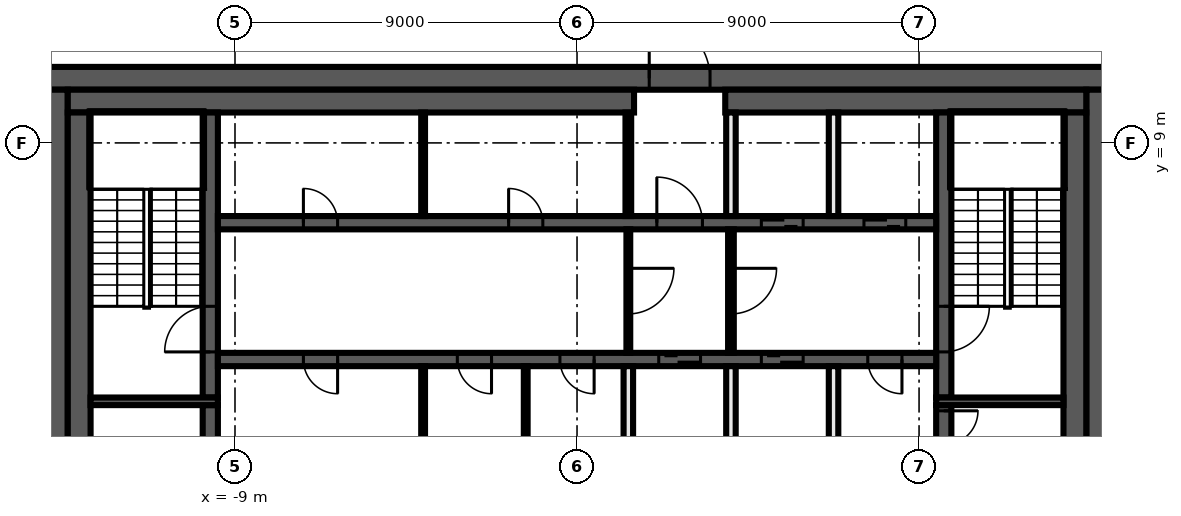
"""IFC4 building model, lengths in metres.
Left out: names, types, materials, properties, quantities, classifications, styles, units other than length and angle.
Written with IfcOpenShell. Run it as: python <this file> out.ifc"""

import sys

from ifc_helpers import new_model, si_unit, direction, frame, frame_2d, origin, place, context, subcontext, project, spatial, rectangle, extrude, element, fill, save


model = new_model("IFC4")
c1 = context("Model", 3, precision=1e-05, world=origin(), true_north=direction((0.0, 1.0)))
c2 = subcontext(c1, "Body", "Model", "MODEL_VIEW")
j1 = project(units=[si_unit("LENGTHUNIT", "METRE"), si_unit("PLANEANGLEUNIT", "RADIAN")], contexts=[c1])
p1 = place(None, origin())
s1 = spatial("IfcSite", under=j1, at=p1, CompositionType="ELEMENT")
p2 = place(p1, origin())
s2 = spatial("IfcBuilding", under=s1, at=p2, CompositionType="ELEMENT")
p3 = place(p2, frame((0.0, 0.0, 302.6)))
s3 = spatial("IfcBuildingStorey", under=s2, at=p3, CompositionType="ELEMENT", Elevation=302.6)
p4 = place(p3, frame((-14.0, 10.7, 0.0), z_axis=(0.0, 0.0, 1.0), x_axis=(1.0, 0.0, 0.0)))
e1 = element("IfcWall", 1, at=p4, inside=s3, PredefinedType="SHEAR", context=c2, shape_type="SweptSolid", body=[
    extrude(rectangle(XDim=28.0, YDim=0.6, at=frame_2d((14.0, 0.0))), origin(), (0.0, 0.0, 1.0), 3.82),
])
p5 = place(p4, frame((15.9, 0.0, 0.0)))
e2 = element("IfcOpeningElement", 2, at=p5, cuts=e1, PredefinedType="OPENING", context=c2, shape_type="SweptSolid", body=[
    extrude(rectangle(XDim=1.6, YDim=2.1, at=frame_2d((0.8, 1.05))), frame((0.0, 0.31, 0.0), z_axis=(0.0, -1.0, 0.0), x_axis=(1.0, 0.0, 0.0)), (0.0, 0.0, 1.0), 0.62),
])
for number, where, z_axis, x_axis in (
    (3, (13.7, 10.4, 0.0), (0.0, 0.0, 1.0), (0.0, -1.0, 0.0)),
    (4, (-13.7, -10.4, 0.0), (0.0, 0.0, 1.0), (0.0, 1.0, 0.0)),
):
    element("IfcWall", number, at=place(p3, frame(where, z_axis=z_axis, x_axis=x_axis)), inside=s3, PredefinedType="SHEAR", context=c2, shape_type="SweptSolid", body=[
        extrude(rectangle(XDim=20.8, YDim=0.6, at=frame_2d((10.4, 0.0))), origin(), (0.0, 0.0, 1.0), 3.82),
    ])
p6 = place(p3, frame((-13.4, 10.1, 0.0), z_axis=(0.0, 0.0, 1.0), x_axis=(1.0, 0.0, 0.0)))
e5 = element("IfcWall", 5, at=p6, inside=s3, PredefinedType="SHEAR", context=c2, shape_type="SweptSolid", body=[
    extrude(rectangle(XDim=14.9, YDim=0.6, at=frame_2d((7.45, 0.0))), origin(), (0.0, 0.0, 1.0), 3.82),
])
p7 = place(p3, frame((3.9, 10.1, 0.0), z_axis=(0.0, 0.0, 1.0), x_axis=(1.0, 0.0, 0.0)))
e6 = element("IfcWall", 6, at=p7, inside=s3, PredefinedType="SHEAR", context=c2, shape_type="SweptSolid", body=[
    extrude(rectangle(XDim=9.5, YDim=0.6, at=frame_2d((4.75, 0.0))), origin(), (0.0, 0.0, 1.0), 3.82),
])
for number, where, z_axis, x_axis in (
    (7, (13.1, 9.8, 0.0), (0.0, 0.0, 1.0), (0.0, -1.0, 0.0)),
    (8, (-13.1, -9.8, 0.0), (0.0, 0.0, 1.0), (0.0, 1.0, 0.0)),
):
    element("IfcWall", number, at=place(p3, frame(where, z_axis=z_axis, x_axis=x_axis)), inside=s3, PredefinedType="SHEAR", context=c2, shape_type="SweptSolid", body=[
        extrude(rectangle(XDim=19.6, YDim=0.6, at=frame_2d((9.8, 0.0))), origin(), (0.0, 0.0, 1.0), 3.82),
    ])
p8 = place(p3, frame((9.65, 2.1, 0.0), z_axis=(0.0, 0.0, 1.0), x_axis=(0.0, -1.0, 0.0)))
e9 = element("IfcWall", 9, at=p8, inside=s3, PredefinedType="SHEAR", context=c2, shape_type="SweptSolid", body=[
    extrude(rectangle(XDim=4.2, YDim=0.4, at=frame_2d((2.1, 0.0))), origin(), (0.0, 0.0, 1.0), 3.82),
])
p9 = place(p8, frame((0.15, 0.0, 0.0)))
e10 = element("IfcOpeningElement", 10, at=p9, cuts=e9, PredefinedType="OPENING", context=c2, shape_type="SweptSolid", body=[
    extrude(rectangle(XDim=0.9, YDim=2.1, at=frame_2d((0.45, 1.05))), frame((0.0, 0.21, 0.0), z_axis=(0.0, -1.0, 0.0), x_axis=(1.0, 0.0, 0.0)), (0.0, 0.0, 1.0), 0.42),
])
p10 = place(p3, frame((9.65, 9.8, 0.0), z_axis=(0.0, 0.0, 1.0), x_axis=(0.0, -1.0, 0.0)))
e11 = element("IfcWall", 11, at=p10, inside=s3, PredefinedType="SHEAR", context=c2, shape_type="SweptSolid", body=[
    extrude(rectangle(XDim=7.5, YDim=0.4, at=frame_2d((3.75, 0.0))), origin(), (0.0, 0.0, 1.0), 3.82),
])
p11 = place(p10, frame((5.1, 0.0, 0.0)))
e12 = element("IfcOpeningElement", 12, at=p11, cuts=e11, PredefinedType="OPENING", context=c2, shape_type="SweptSolid", body=[
    extrude(rectangle(XDim=1.2, YDim=2.1, at=frame_2d((0.6, 1.05))), frame((0.0, 0.21, 0.0), z_axis=(0.0, -1.0, 0.0), x_axis=(1.0, 0.0, 0.0)), (0.0, 0.0, 1.0), 0.42),
])
p12 = place(p3, frame((-9.65, -2.1, 0.0), z_axis=(0.0, 0.0, 1.0), x_axis=(0.0, 1.0, 0.0)))
e13 = element("IfcWall", 13, at=p12, inside=s3, PredefinedType="SHEAR", context=c2, shape_type="SweptSolid", body=[
    extrude(rectangle(XDim=4.2, YDim=0.4, at=frame_2d((2.1, 0.0))), origin(), (0.0, 0.0, 1.0), 3.82),
])
p13 = place(p3, frame((-9.65, 2.3, 0.0), z_axis=(0.0, 0.0, 1.0), x_axis=(0.0, 1.0, 0.0)))
e14 = element("IfcWall", 14, at=p13, inside=s3, PredefinedType="SHEAR", context=c2, shape_type="SweptSolid", body=[
    extrude(rectangle(XDim=7.5, YDim=0.4, at=frame_2d((3.75, 0.0))), origin(), (0.0, 0.0, 1.0), 3.82),
])
p14 = place(p13, frame((1.2, 0.0, 0.0)))
e15 = element("IfcOpeningElement", 15, at=p14, cuts=e14, PredefinedType="OPENING", context=c2, shape_type="SweptSolid", body=[
    extrude(rectangle(XDim=1.2, YDim=2.1, at=frame_2d((0.6, 1.05))), frame((0.0, 0.21, 0.0), z_axis=(0.0, -1.0, 0.0), x_axis=(1.0, 0.0, 0.0)), (0.0, 0.0, 1.0), 0.42),
])
for number, where, z_axis, x_axis in (
    (16, (9.45, 2.2, 0.0), (0.0, 0.0, 1.0), (1.0, 0.0, 0.0)),
    (17, (-9.45, 2.2, 0.0), (0.0, 0.0, 1.0), (-1.0, 0.0, 0.0)),
):
    element("IfcWall", number, at=place(p3, frame(where, z_axis=z_axis, x_axis=x_axis)), inside=s3, PredefinedType="SHEAR", context=c2, shape_type="SweptSolid", body=[
        extrude(rectangle(XDim=3.35, YDim=0.2, at=frame_2d((1.675, 0.0))), origin(), (0.0, 0.0, 1.0), 3.82),
    ])
p15 = place(p3, frame((-9.45, 6.9, 0.0), z_axis=(0.0, 0.0, 1.0), x_axis=(1.0, 0.0, 0.0)))
e18 = element("IfcWall", 18, at=p15, inside=s3, PredefinedType="SHEAR", context=c2, shape_type="SweptSolid", body=[
    extrude(rectangle(XDim=18.9, YDim=0.35, at=frame_2d((9.45, 0.0))), origin(), (0.0, 0.0, 1.0), 3.82),
])
p16 = place(p15, frame((11.55, 0.0, 0.0)))
e19 = element("IfcOpeningElement", 19, at=p16, cuts=e18, PredefinedType="OPENING", context=c2, shape_type="SweptSolid", body=[
    extrude(rectangle(XDim=1.2, YDim=2.1, at=frame_2d((0.6, 1.05))), frame((0.0, 0.185, 0.0), z_axis=(0.0, -1.0, 0.0), x_axis=(1.0, 0.0, 0.0)), (0.0, 0.0, 1.0), 0.37),
])
p17 = place(p15, frame((14.3, 0.0, 0.0)))
e20 = element("IfcOpeningElement", 20, at=p17, cuts=e18, PredefinedType="OPENING", context=c2, shape_type="SweptSolid", body=[
    extrude(rectangle(XDim=1.1, YDim=2.1, at=frame_2d((0.55, 1.05))), frame((0.0, 0.185, 0.0), z_axis=(0.0, -1.0, 0.0), x_axis=(1.0, 0.0, 0.0)), (0.0, 0.0, 1.0), 0.37),
])
p18 = place(p15, frame((17.0, 0.0, 0.0)))
e21 = element("IfcOpeningElement", 21, at=p18, cuts=e18, PredefinedType="OPENING", context=c2, shape_type="SweptSolid", body=[
    extrude(rectangle(XDim=1.1, YDim=2.1, at=frame_2d((0.55, 1.05))), frame((0.0, 0.185, 0.0), z_axis=(0.0, -1.0, 0.0), x_axis=(1.0, 0.0, 0.0)), (0.0, 0.0, 1.0), 0.37),
])
p19 = place(p15, frame((2.25, 0.0, 0.0)))
e22 = element("IfcOpeningElement", 22, at=p19, cuts=e18, PredefinedType="OPENING", context=c2, shape_type="SweptSolid", body=[
    extrude(rectangle(XDim=0.9, YDim=2.1, at=frame_2d((0.45, 1.05))), frame((0.0, 0.185, 0.0), z_axis=(0.0, -1.0, 0.0), x_axis=(1.0, 0.0, 0.0)), (0.0, 0.0, 1.0), 0.37),
])
p20 = place(p15, frame((7.65, 0.0, 0.0)))
e23 = element("IfcOpeningElement", 23, at=p20, cuts=e18, PredefinedType="OPENING", context=c2, shape_type="SweptSolid", body=[
    extrude(rectangle(XDim=0.9, YDim=2.1, at=frame_2d((0.45, 1.05))), frame((0.0, 0.185, 0.0), z_axis=(0.0, -1.0, 0.0), x_axis=(1.0, 0.0, 0.0)), (0.0, 0.0, 1.0), 0.37),
])
p21 = place(p3, frame((9.45, 3.3, 0.0), z_axis=(0.0, 0.0, 1.0), x_axis=(-1.0, 0.0, 0.0)))
e24 = element("IfcWall", 24, at=p21, inside=s3, PredefinedType="SHEAR", context=c2, shape_type="SweptSolid", body=[
    extrude(rectangle(XDim=18.9, YDim=0.35, at=frame_2d((9.45, 0.0))), origin(), (0.0, 0.0, 1.0), 3.82),
])
p22 = place(p21, frame((6.2, 0.0, 0.0)))
e25 = element("IfcOpeningElement", 25, at=p22, cuts=e24, PredefinedType="OPENING", context=c2, shape_type="SweptSolid", body=[
    extrude(rectangle(XDim=1.1, YDim=2.1, at=frame_2d((0.55, 1.05))), frame((0.0, 0.185, 0.0), z_axis=(0.0, -1.0, 0.0), x_axis=(1.0, 0.0, 0.0)), (0.0, 0.0, 1.0), 0.37),
])
p23 = place(p21, frame((3.5, 0.0, 0.0)))
e26 = element("IfcOpeningElement", 26, at=p23, cuts=e24, PredefinedType="OPENING", context=c2, shape_type="SweptSolid", body=[
    extrude(rectangle(XDim=1.1, YDim=2.1, at=frame_2d((0.55, 1.05))), frame((0.0, 0.185, 0.0), z_axis=(0.0, -1.0, 0.0), x_axis=(1.0, 0.0, 0.0)), (0.0, 0.0, 1.0), 0.37),
])
p24 = place(p21, frame((0.9, 0.0, 0.0)))
e27 = element("IfcOpeningElement", 27, at=p24, cuts=e24, PredefinedType="OPENING", context=c2, shape_type="SweptSolid", body=[
    extrude(rectangle(XDim=0.9, YDim=2.1, at=frame_2d((0.45, 1.05))), frame((0.0, 0.185, 0.0), z_axis=(0.0, -1.0, 0.0), x_axis=(1.0, 0.0, 0.0)), (0.0, 0.0, 1.0), 0.37),
])
p25 = place(p21, frame((15.75, 0.0, 0.0)))
e28 = element("IfcOpeningElement", 28, at=p25, cuts=e24, PredefinedType="OPENING", context=c2, shape_type="SweptSolid", body=[
    extrude(rectangle(XDim=0.9, YDim=2.1, at=frame_2d((0.45, 1.05))), frame((0.0, 0.185, 0.0), z_axis=(0.0, -1.0, 0.0), x_axis=(1.0, 0.0, 0.0)), (0.0, 0.0, 1.0), 0.37),
])
p26 = place(p21, frame((11.7, 0.0, 0.0)))
e29 = element("IfcOpeningElement", 29, at=p26, cuts=e24, PredefinedType="OPENING", context=c2, shape_type="SweptSolid", body=[
    extrude(rectangle(XDim=0.9, YDim=2.1, at=frame_2d((0.45, 1.05))), frame((0.0, 0.185, 0.0), z_axis=(0.0, -1.0, 0.0), x_axis=(1.0, 0.0, 0.0)), (0.0, 0.0, 1.0), 0.37),
])
p27 = place(p21, frame((9.0, 0.0, 0.0)))
e30 = element("IfcOpeningElement", 30, at=p27, cuts=e24, PredefinedType="OPENING", context=c2, shape_type="SweptSolid", body=[
    extrude(rectangle(XDim=0.9, YDim=2.1, at=frame_2d((0.45, 1.05))), frame((0.0, 0.185, 0.0), z_axis=(0.0, -1.0, 0.0), x_axis=(1.0, 0.0, 0.0)), (0.0, 0.0, 1.0), 0.37),
])
for number, where, z_axis, x_axis in (
    (31, (6.75, 0.4, 0.0), (0.0, 0.0, 1.0), (0.0, 1.0, 0.0)),
    (32, (6.75, 7.075, 0.0), (0.0, 0.0, 1.0), (0.0, 1.0, 0.0)),
):
    element("IfcWall", number, at=place(p3, frame(where, z_axis=z_axis, x_axis=x_axis)), inside=s3, PredefinedType="SOLIDWALL", context=c2, shape_type="SweptSolid", body=[
        extrude(rectangle(XDim=2.725, YDim=0.25, at=frame_2d((1.363, 0.0))), origin(), (0.0, 0.0, 1.0), 3.82),
    ])
p28 = place(p3, frame((4.05, 6.725, 0.0), z_axis=(0.0, 0.0, 1.0), x_axis=(0.0, -1.0, 0.0)))
e33 = element("IfcWall", 33, at=p28, inside=s3, PredefinedType="PARTITIONING", context=c2, shape_type="SweptSolid", body=[
    extrude(rectangle(XDim=3.25, YDim=0.15, at=frame_2d((1.625, 0.0))), origin(), (0.0, 0.0, 1.0), 3.82),
])
p29 = place(p28, frame((1.025, 0.0, 0.0)))
e34 = element("IfcOpeningElement", 34, at=p29, cuts=e33, PredefinedType="OPENING", context=c2, shape_type="SweptSolid", body=[
    extrude(rectangle(XDim=1.2, YDim=2.1, at=frame_2d((0.6, 1.05))), frame((0.0, 0.085, 0.0), z_axis=(0.0, -1.0, 0.0), x_axis=(1.0, 0.0, 0.0)), (0.0, 0.0, 1.0), 0.17),
])
for number, where, z_axis, x_axis in (
    (35, (4.05, 0.4, 0.0), (0.0, 0.0, 1.0), (0.0, 1.0, 0.0)),
    (36, (4.05, 7.075, 0.0), (0.0, 0.0, 1.0), (0.0, 1.0, 0.0)),
):
    element("IfcWall", number, at=place(p3, frame(where, z_axis=z_axis, x_axis=x_axis)), inside=s3, PredefinedType="SOLIDWALL", context=c2, shape_type="SweptSolid", body=[
        extrude(rectangle(XDim=2.725, YDim=0.25, at=frame_2d((1.363, 0.0))), origin(), (0.0, 0.0, 1.0), 3.82),
    ])
p30 = place(p3, frame((1.35, 7.075, 0.0), z_axis=(0.0, 0.0, 1.0), x_axis=(0.0, 1.0, 0.0)))
e37 = element("IfcWall", 37, at=p30, inside=s3, PredefinedType="PARTITIONING", context=c2, shape_type="SweptSolid", body=[
    extrude(rectangle(XDim=2.725, YDim=0.15, at=frame_2d((1.363, 0.0))), origin(), (0.0, 0.0, 1.0), 3.82),
])
p31 = place(p3, frame((1.35, 6.725, 0.0), z_axis=(0.0, 0.0, 1.0), x_axis=(0.0, -1.0, 0.0)))
e38 = element("IfcWall", 38, at=p31, inside=s3, PredefinedType="PARTITIONING", context=c2, shape_type="SweptSolid", body=[
    extrude(rectangle(XDim=3.25, YDim=0.1, at=frame_2d((1.625, 0.0))), origin(), (0.0, 0.0, 1.0), 3.82),
])
p32 = place(p31, frame((1.025, 0.0, 0.0)))
e39 = element("IfcOpeningElement", 39, at=p32, cuts=e38, PredefinedType="OPENING", context=c2, shape_type="SweptSolid", body=[
    extrude(rectangle(XDim=1.2, YDim=2.1, at=frame_2d((0.6, 1.05))), frame((0.0, 0.06, 0.0), z_axis=(0.0, -1.0, 0.0), x_axis=(1.0, 0.0, 0.0)), (0.0, 0.0, 1.0), 0.12),
])
p33 = place(p3, frame((1.35, 0.4, 0.0), z_axis=(0.0, 0.0, 1.0), x_axis=(0.0, 1.0, 0.0)))
e40 = element("IfcWall", 40, at=p33, inside=s3, PredefinedType="SOLIDWALL", context=c2, shape_type="SweptSolid", body=[
    extrude(rectangle(XDim=2.725, YDim=0.25, at=frame_2d((1.363, 0.0))), origin(), (0.0, 0.0, 1.0), 3.82),
])
for number, where, z_axis, x_axis in (
    (41, (-1.35, 0.4, 0.0), (0.0, 0.0, 1.0), (0.0, 1.0, 0.0)),
    (42, (-4.05, 0.4, 0.0), (0.0, 0.0, 1.0), (0.0, 1.0, 0.0)),
    (43, (-4.05, 7.075, 0.0), (0.0, 0.0, 1.0), (0.0, 1.0, 0.0)),
):
    element("IfcWall", number, at=place(p3, frame(where, z_axis=z_axis, x_axis=x_axis)), inside=s3, PredefinedType="PARTITIONING", context=c2, shape_type="SweptSolid", body=[
        extrude(rectangle(XDim=2.725, YDim=0.1, at=frame_2d((1.363, 0.0))), origin(), (0.0, 0.0, 1.0), 3.82),
    ])
p34 = place(p9, origin())
e44 = element("IfcDoor", 44, at=p34, inside=s3, OperationType="SINGLE_SWING_RIGHT", PredefinedType="DOOR", context=c2, shape_type="SweptSolid", body=[
    extrude(rectangle(XDim=0.9, YDim=2.1, at=frame_2d((0.45, 1.05))), frame((0.0, 0.025, 0.0), z_axis=(0.0, -1.0, 0.0), x_axis=(1.0, 0.0, 0.0)), (0.0, 0.0, 1.0), 0.05),
])
fill(e10, e44)
p35 = place(p5, origin())
e45 = element("IfcDoor", 45, at=p35, inside=s3, OperationType="DOUBLE_DOOR_SINGLE_SWING", PredefinedType="DOOR", context=c2, shape_type="SweptSolid", body=[
    extrude(rectangle(XDim=1.6, YDim=2.1, at=frame_2d((0.8, 1.05))), frame((0.0, 0.025, 0.0), z_axis=(0.0, -1.0, 0.0), x_axis=(1.0, 0.0, 0.0)), (0.0, 0.0, 1.0), 0.05),
])
fill(e2, e45)
p36 = place(p16, origin())
e46 = element("IfcDoor", 46, at=p36, inside=s3, OperationType="SINGLE_SWING_LEFT", PredefinedType="DOOR", context=c2, shape_type="SweptSolid", body=[
    extrude(rectangle(XDim=1.2, YDim=2.1, at=frame_2d((0.6, 1.05))), frame((0.0, 0.025, 0.0), z_axis=(0.0, -1.0, 0.0), x_axis=(1.0, 0.0, 0.0)), (0.0, 0.0, 1.0), 0.05),
])
fill(e19, e46)
p37 = place(p17, origin())
e47 = element("IfcDoor", 47, at=p37, inside=s3, OperationType="DOUBLE_DOOR_SLIDING", PredefinedType="DOOR", context=c2, shape_type="SweptSolid", body=[
    extrude(rectangle(XDim=1.1, YDim=2.1, at=frame_2d((0.55, 1.05))), frame((0.0, 0.025, 0.0), z_axis=(0.0, -1.0, 0.0), x_axis=(1.0, 0.0, 0.0)), (0.0, 0.0, 1.0), 0.05),
])
fill(e20, e47)
p38 = place(p18, origin())
e48 = element("IfcDoor", 48, at=p38, inside=s3, OperationType="DOUBLE_DOOR_SLIDING", PredefinedType="DOOR", context=c2, shape_type="SweptSolid", body=[
    extrude(rectangle(XDim=1.1, YDim=2.1, at=frame_2d((0.55, 1.05))), frame((0.0, 0.025, 0.0), z_axis=(0.0, -1.0, 0.0), x_axis=(1.0, 0.0, 0.0)), (0.0, 0.0, 1.0), 0.05),
])
fill(e21, e48)
p39 = place(p22, origin())
e49 = element("IfcDoor", 49, at=p39, inside=s3, OperationType="DOUBLE_DOOR_SLIDING", PredefinedType="DOOR", context=c2, shape_type="SweptSolid", body=[
    extrude(rectangle(XDim=1.1, YDim=2.1, at=frame_2d((0.55, 1.05))), frame((0.0, 0.025, 0.0), z_axis=(0.0, -1.0, 0.0), x_axis=(1.0, 0.0, 0.0)), (0.0, 0.0, 1.0), 0.05),
])
fill(e25, e49)
p40 = place(p23, origin())
e50 = element("IfcDoor", 50, at=p40, inside=s3, OperationType="DOUBLE_DOOR_SLIDING", PredefinedType="DOOR", context=c2, shape_type="SweptSolid", body=[
    extrude(rectangle(XDim=1.1, YDim=2.1, at=frame_2d((0.55, 1.05))), frame((0.0, 0.025, 0.0), z_axis=(0.0, -1.0, 0.0), x_axis=(1.0, 0.0, 0.0)), (0.0, 0.0, 1.0), 0.05),
])
fill(e26, e50)
p41 = place(p24, origin())
e51 = element("IfcDoor", 51, at=p41, inside=s3, OperationType="SINGLE_SWING_LEFT", PredefinedType="DOOR", context=c2, shape_type="SweptSolid", body=[
    extrude(rectangle(XDim=0.9, YDim=2.1, at=frame_2d((0.45, 1.05))), frame((0.0, 0.025, 0.0), z_axis=(0.0, -1.0, 0.0), x_axis=(1.0, 0.0, 0.0)), (0.0, 0.0, 1.0), 0.05),
])
fill(e27, e51)
p42 = place(p19, origin())
e52 = element("IfcDoor", 52, at=p42, inside=s3, OperationType="SINGLE_SWING_RIGHT", PredefinedType="DOOR", context=c2, shape_type="SweptSolid", body=[
    extrude(rectangle(XDim=0.9, YDim=2.1, at=frame_2d((0.45, 1.05))), frame((0.0, 0.025, 0.0), z_axis=(0.0, -1.0, 0.0), x_axis=(1.0, 0.0, 0.0)), (0.0, 0.0, 1.0), 0.05),
])
fill(e22, e52)
p43 = place(p20, origin())
e53 = element("IfcDoor", 53, at=p43, inside=s3, OperationType="SINGLE_SWING_LEFT", PredefinedType="DOOR", context=c2, shape_type="SweptSolid", body=[
    extrude(rectangle(XDim=0.9, YDim=2.1, at=frame_2d((0.45, 1.05))), frame((0.0, 0.025, 0.0), z_axis=(0.0, -1.0, 0.0), x_axis=(1.0, 0.0, 0.0)), (0.0, 0.0, 1.0), 0.05),
])
fill(e23, e53)
p44 = place(p25, origin())
e54 = element("IfcDoor", 54, at=p44, inside=s3, OperationType="SINGLE_SWING_RIGHT", PredefinedType="DOOR", context=c2, shape_type="SweptSolid", body=[
    extrude(rectangle(XDim=0.9, YDim=2.1, at=frame_2d((0.45, 1.05))), frame((0.0, 0.025, 0.0), z_axis=(0.0, -1.0, 0.0), x_axis=(1.0, 0.0, 0.0)), (0.0, 0.0, 1.0), 0.05),
])
fill(e28, e54)
p45 = place(p26, origin())
e55 = element("IfcDoor", 55, at=p45, inside=s3, OperationType="SINGLE_SWING_LEFT", PredefinedType="DOOR", context=c2, shape_type="SweptSolid", body=[
    extrude(rectangle(XDim=0.9, YDim=2.1, at=frame_2d((0.45, 1.05))), frame((0.0, 0.025, 0.0), z_axis=(0.0, -1.0, 0.0), x_axis=(1.0, 0.0, 0.0)), (0.0, 0.0, 1.0), 0.05),
])
fill(e29, e55)
p46 = place(p27, origin())
e56 = element("IfcDoor", 56, at=p46, inside=s3, OperationType="SINGLE_SWING_RIGHT", PredefinedType="DOOR", context=c2, shape_type="SweptSolid", body=[
    extrude(rectangle(XDim=0.9, YDim=2.1, at=frame_2d((0.45, 1.05))), frame((0.0, 0.025, 0.0), z_axis=(0.0, -1.0, 0.0), x_axis=(1.0, 0.0, 0.0)), (0.0, 0.0, 1.0), 0.05),
])
fill(e30, e56)
p47 = place(p11, origin())
e57 = element("IfcDoor", 57, at=p47, inside=s3, OperationType="SINGLE_SWING_LEFT", PredefinedType="DOOR", context=c2, shape_type="SweptSolid", body=[
    extrude(rectangle(XDim=1.2, YDim=2.1, at=frame_2d((0.6, 1.05))), frame((0.0, 0.025, 0.0), z_axis=(0.0, -1.0, 0.0), x_axis=(1.0, 0.0, 0.0)), (0.0, 0.0, 1.0), 0.05),
])
fill(e12, e57)
p48 = place(p14, origin())
e58 = element("IfcDoor", 58, at=p48, inside=s3, OperationType="SINGLE_SWING_RIGHT", PredefinedType="DOOR", context=c2, shape_type="SweptSolid", body=[
    extrude(rectangle(XDim=1.2, YDim=2.1, at=frame_2d((0.6, 1.05))), frame((0.0, 0.025, 0.0), z_axis=(0.0, -1.0, 0.0), x_axis=(1.0, 0.0, 0.0)), (0.0, 0.0, 1.0), 0.05),
])
fill(e15, e58)
p49 = place(p32, origin())
e59 = element("IfcDoor", 59, at=p49, inside=s3, OperationType="SINGLE_SWING_LEFT", PredefinedType="DOOR", context=c2, shape_type="SweptSolid", body=[
    extrude(rectangle(XDim=1.2, YDim=2.1, at=frame_2d((0.6, 1.05))), frame((0.0, 0.025, 0.0), z_axis=(0.0, -1.0, 0.0), x_axis=(1.0, 0.0, 0.0)), (0.0, 0.0, 1.0), 0.05),
])
fill(e39, e59)
p50 = place(p29, origin())
e60 = element("IfcDoor", 60, at=p50, inside=s3, OperationType="SINGLE_SWING_RIGHT", PredefinedType="DOOR", context=c2, shape_type="SweptSolid", body=[
    extrude(rectangle(XDim=1.2, YDim=2.1, at=frame_2d((0.6, 1.05))), frame((0.0, 0.025, 0.0), z_axis=(0.0, -1.0, 0.0), x_axis=(1.0, 0.0, 0.0)), (0.0, 0.0, 1.0), 0.05),
])
fill(e34, e60)
save(model, sys.argv[1])
